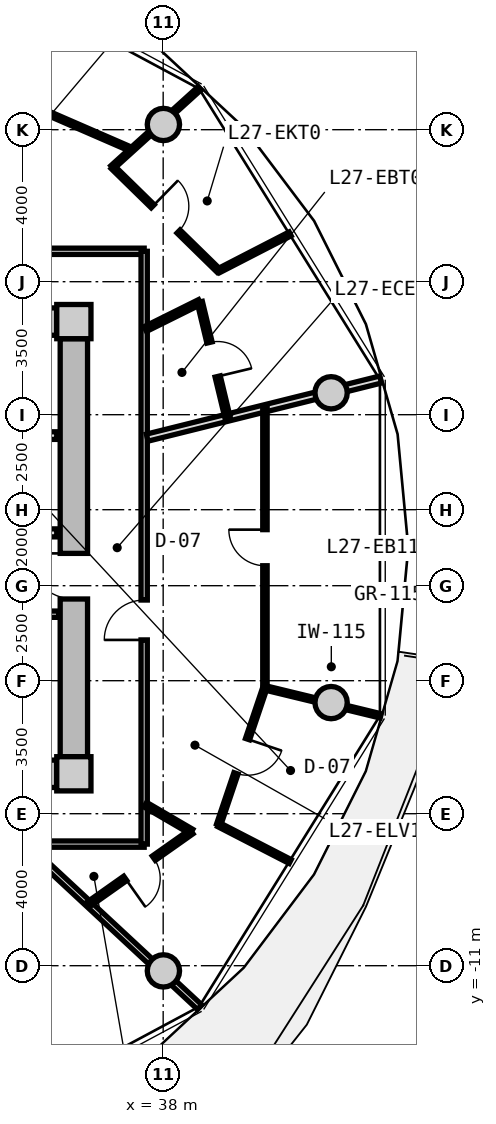
"""IFC4 building model, lengths in metres.
Left out: names, types, materials, properties, quantities, classifications, styles, units other than length and angle.
Written with IfcOpenShell. Run it as: python <this file> out.ifc"""

import sys

from ifc_helpers import new_model, si_unit, direction, frame, frame_2d, origin, origin_2d, place, context, subcontext, project, spatial, rectangle, circle, extrude, source, transform, mapped, element, fill, save


model = new_model("IFC4")
c1 = context("Model", 3, precision=1e-05, world=origin(), true_north=direction((0.0, 1.0)))
c2 = subcontext(c1, "Body", "Model", "MODEL_VIEW")
j1 = project(units=[si_unit("LENGTHUNIT", "METRE"), si_unit("PLANEANGLEUNIT", "RADIAN")], contexts=[c1])
p1 = place(None, origin())
s1 = spatial("IfcSite", under=j1, at=p1, CompositionType="ELEMENT")
p2 = place(p1, origin())
s2 = spatial("IfcBuilding", under=s1, at=p2, CompositionType="ELEMENT")
p3 = place(p2, frame((0.0, 0.0, 90.15)))
s3 = spatial("IfcBuildingStorey", under=s2, at=p3, CompositionType="ELEMENT", Elevation=90.15)
m1 = source(origin(), c2, "Body", "SweptSolid", [
    extrude(rectangle(XDim=0.9, YDim=0.9, at=origin_2d()), origin(), (0.0, 0.0, 1.0), 3.05),
])
for number, where, z_axis, x_axis in (
    (1, (35.65, -5.95, 0.0), (0.0, 0.0, 1.0), (1.0, 0.0, 0.0)),
    (2, (35.65, 5.95, 0.0), (0.0, 0.0, 1.0), (1.0, 0.0, 0.0)),
):
    element("IfcColumn", number, at=place(p3, frame(where, z_axis=z_axis, x_axis=x_axis)), inside=s3, PredefinedType="COLUMN", context=c2, shape_type="MappedRepresentation", body=[
        mapped(m1, transform((0.0, 0.0, 0.0), x_axis=(1.0, 0.0, 0.0), y_axis=(0.0, 1.0, 0.0), z_axis=(0.0, 0.0, 1.0), scale=1.0)),
    ])
m2 = source(origin(), c2, "Body", "SweptSolid", [
    extrude(rectangle(XDim=14.4, YDim=0.72, at=frame_2d((7.2, 0.0))), origin(), (0.0, 0.0, 1.0), 2.79),
])
for number, where, z_axis, x_axis in (
    (3, (20.8, 5.95, 0.0), (0.0, 0.0, 1.0), (1.0, 0.0, 0.0)),
    (4, (35.2, -5.95, 0.0), (0.0, 0.0, 1.0), (-1.0, 0.0, 0.0)),
):
    element("IfcWall", number, at=place(p3, frame(where, z_axis=z_axis, x_axis=x_axis)), inside=s3, PredefinedType="SHEAR", context=c2, shape_type="MappedRepresentation", body=[
        mapped(m2, transform((0.0, 0.0, 0.0), x_axis=(1.0, 0.0, 0.0), y_axis=(0.0, 1.0, 0.0), z_axis=(0.0, 0.0, 1.0), scale=1.0)),
    ])
m3 = source(origin(), c2, "Body", "SweptSolid", [
    extrude(rectangle(XDim=11.0, YDim=0.72, at=frame_2d((5.5, 0.0))), origin(), (0.0, 0.0, 1.0), 2.79),
])
p4 = place(p3, frame((35.65, 5.5, 0.0), z_axis=(0.0, 0.0, 1.0), x_axis=(0.0, -1.0, 0.0)))
e5 = element("IfcWall", 5, at=p4, inside=s3, PredefinedType="SHEAR", context=c2, shape_type="MappedRepresentation", body=[
    mapped(m3, transform((0.0, 0.0, 0.0), x_axis=(1.0, 0.0, 0.0), y_axis=(0.0, 1.0, 0.0), z_axis=(0.0, 0.0, 1.0), scale=1.0)),
])
p5 = place(p4, frame((5.65, 0.0, 0.0)))
e6 = element("IfcOpeningElement", 6, at=p5, cuts=e5, PredefinedType="OPENING", context=c2, shape_type="SweptSolid", body=[
    extrude(rectangle(XDim=1.2, YDim=2.15, at=frame_2d((0.6, 1.075))), frame((0.0, 0.37, 0.0), z_axis=(0.0, -1.0, 0.0), x_axis=(1.0, 0.0, 0.0)), (0.0, 0.0, 1.0), 0.74),
])
m4 = source(origin(), c2, "Body", "SweptSolid", [
    extrude(circle(Radius=0.425, at=origin_2d()), origin(), (0.0, 0.0, 1.0), 3.05),
])
for number, where, z_axis, x_axis in (
    (7, (42.419, 4.076, 0.0), (0.0, 0.0, 1.0), (1.0, 0.0, 0.0)),
    (8, (38.006, 11.137, 0.0), (0.0, 0.0, 1.0), (1.0, 0.0, 0.0)),
    (9, (38.006, -11.137, 0.0), (0.0, 0.0, 1.0), (1.0, 0.0, 0.0)),
    (10, (42.419, -4.076, 0.0), (0.0, 0.0, 1.0), (1.0, 0.0, 0.0)),
):
    element("IfcColumn", number, at=place(p3, frame(where, z_axis=z_axis, x_axis=x_axis)), inside=s3, PredefinedType="COLUMN", context=c2, shape_type="MappedRepresentation", body=[
        mapped(m4, transform((0.0, 0.0, 0.0), x_axis=(1.0, 0.0, 0.0), y_axis=(0.0, 1.0, 0.0), z_axis=(0.0, 0.0, 1.0), scale=1.0)),
    ])
m5 = source(origin(), c2, "Body", "SweptSolid", [
    extrude(rectangle(XDim=3.2, YDim=0.2, at=frame_2d((1.6, 0.0))), origin(), (0.0, 0.0, 1.0), 2.775),
])
p6 = place(p3, frame((32.0, 2.95, 0.0), z_axis=(0.0, 0.0, 1.0), x_axis=(1.0, 0.0, 0.0)))
e11 = element("IfcWall", 11, at=p6, inside=s3, PredefinedType="PARTITIONING", context=c2, shape_type="MappedRepresentation", body=[
    mapped(m5, transform((0.0, 0.0, 0.0), x_axis=(1.0, 0.0, 0.0), y_axis=(0.0, 1.0, 0.0), z_axis=(0.0, 0.0, 1.0), scale=1.0)),
])
m6 = source(origin(), c2, "Body", "SweptSolid", [
    extrude(rectangle(XDim=6.66, YDim=0.21, at=frame_2d((3.33, 0.0))), origin(), (0.0, 0.0, 1.0), 2.775),
])
p7 = place(p3, frame((28.54, 0.39, 0.0), z_axis=(0.0, 0.0, 1.0), x_axis=(1.0, 0.0, 0.0)))
e12 = element("IfcWall", 12, at=p7, inside=s3, PredefinedType="PARTITIONING", context=c2, shape_type="MappedRepresentation", body=[
    mapped(m6, transform((0.0, 0.0, 0.0), x_axis=(1.0, 0.0, 0.0), y_axis=(0.0, 1.0, 0.0), z_axis=(0.0, 0.0, 1.0), scale=1.0)),
])
p8 = place(p7, frame((1.0, 0.0, 0.0)))
e13 = element("IfcOpeningElement", 13, at=p8, cuts=e12, PredefinedType="OPENING", context=c2, shape_type="SweptSolid", body=[
    extrude(rectangle(XDim=1.2, YDim=2.15, at=frame_2d((0.6, 1.075))), frame((0.0, 0.115, 0.0), z_axis=(0.0, -1.0, 0.0), x_axis=(1.0, 0.0, 0.0)), (0.0, 0.0, 1.0), 0.23),
])
m7 = source(origin(), c2, "Body", "SweptSolid", [
    extrude(rectangle(XDim=2.7, YDim=0.165, at=frame_2d((1.35, 0.0))), origin(), (0.0, 0.0, 1.0), 2.775),
])
p9 = place(p3, frame((32.55, -1.75, 0.0), z_axis=(0.0, 0.0, 1.0), x_axis=(1.0, 0.0, 0.0)))
e14 = element("IfcWall", 14, at=p9, inside=s3, PredefinedType="PARTITIONING", context=c2, shape_type="MappedRepresentation", body=[
    mapped(m7, transform((0.0, 0.0, 0.0), x_axis=(1.0, 0.0, 0.0), y_axis=(0.0, 1.0, 0.0), z_axis=(0.0, 0.0, 1.0), scale=1.0)),
])
p10 = place(p9, frame((0.222, 0.0, 0.0)))
e15 = element("IfcOpeningElement", 15, at=p10, cuts=e14, PredefinedType="OPENING", context=c2, shape_type="SweptSolid", body=[
    extrude(rectangle(XDim=0.925, YDim=2.1, at=frame_2d((0.462, 1.05))), frame((0.0, 0.093, 0.0), z_axis=(0.0, -1.0, 0.0), x_axis=(1.0, 0.0, 0.0)), (0.0, 0.0, 1.0), 0.185),
])
p11 = place(p9, frame((1.522, 0.0, 0.0)))
e16 = element("IfcOpeningElement", 16, at=p11, cuts=e14, PredefinedType="OPENING", context=c2, shape_type="SweptSolid", body=[
    extrude(rectangle(XDim=0.925, YDim=2.1, at=frame_2d((0.462, 1.05))), frame((0.0, 0.093, 0.0), z_axis=(0.0, -1.0, 0.0), x_axis=(1.0, 0.0, 0.0)), (0.0, 0.0, 1.0), 0.185),
])
m8 = source(origin(), c2, "Body", "SweptSolid", [
    extrude(rectangle(XDim=9.234, YDim=0.165, at=frame_2d((4.617, 0.0))), origin(), (0.0, 0.0, 1.0), 2.775),
])
p12 = place(p3, frame((28.266, 7.8, 0.0), z_axis=(0.0, 0.0, 1.0), x_axis=(1.0, 0.0, 0.0)))
e17 = element("IfcWall", 17, at=p12, inside=s3, PredefinedType="PARTITIONING", context=c2, shape_type="MappedRepresentation", body=[
    mapped(m8, transform((0.0, 0.0, 0.0), x_axis=(1.0, 0.0, 0.0), y_axis=(0.0, 1.0, 0.0), z_axis=(0.0, 0.0, 1.0), scale=1.0)),
])
p13 = place(p12, frame((4.092, 0.0, 0.0)))
e18 = element("IfcOpeningElement", 18, at=p13, cuts=e17, PredefinedType="OPENING", context=c2, shape_type="SweptSolid", body=[
    extrude(rectangle(XDim=1.05, YDim=2.15, at=frame_2d((0.525, 1.075))), frame((0.0, 0.093, 0.0), z_axis=(0.0, -1.0, 0.0), x_axis=(1.0, 0.0, 0.0)), (0.0, 0.0, 1.0), 0.185),
])
m9 = source(origin(), c2, "Body", "SweptSolid", [
    extrude(rectangle(XDim=8.6, YDim=0.165, at=frame_2d((4.3, 0.0))), origin(), (0.0, 0.0, 1.0), 2.775),
])
p14 = place(p3, frame((37.5, -7.8, 0.0), z_axis=(0.0, 0.0, 1.0), x_axis=(-1.0, 0.0, 0.0)))
e19 = element("IfcWall", 19, at=p14, inside=s3, PredefinedType="PARTITIONING", context=c2, shape_type="MappedRepresentation", body=[
    mapped(m9, transform((0.0, 0.0, 0.0), x_axis=(1.0, 0.0, 0.0), y_axis=(0.0, 1.0, 0.0), z_axis=(0.0, 0.0, 1.0), scale=1.0)),
])
m10 = source(origin(), c2, "Body", "SweptSolid", [
    extrude(rectangle(XDim=15.6, YDim=0.165, at=frame_2d((7.8, 0.0))), origin(), (0.0, 0.0, 1.0), 2.775),
])
p15 = place(p3, frame((37.5, 7.8, 0.0), z_axis=(0.0, 0.0, 1.0), x_axis=(0.0, -1.0, 0.0)))
e20 = element("IfcWall", 20, at=p15, inside=s3, PredefinedType="PARTITIONING", context=c2, shape_type="MappedRepresentation", body=[
    mapped(m10, transform((0.0, 0.0, 0.0), x_axis=(1.0, 0.0, 0.0), y_axis=(0.0, 1.0, 0.0), z_axis=(0.0, 0.0, 1.0), scale=1.0)),
])
p16 = place(p15, frame((9.177, 0.0, 0.0)))
e21 = element("IfcOpeningElement", 21, at=p16, cuts=e20, PredefinedType="OPENING", context=c2, shape_type="SweptSolid", body=[
    extrude(rectangle(XDim=1.05, YDim=2.15, at=frame_2d((0.525, 1.075))), frame((0.0, 0.093, 0.0), z_axis=(0.0, -1.0, 0.0), x_axis=(1.0, 0.0, 0.0)), (0.0, 0.0, 1.0), 0.185),
])
m11 = source(origin(), c2, "Body", "SweptSolid", [
    extrude(rectangle(XDim=6.187, YDim=0.165, at=frame_2d((3.093, 0.0))), origin(), (0.0, 0.0, 1.0), 2.275),
])
p17 = place(p3, frame((34.429, -7.88, 0.0), z_axis=(0.0, 0.0, 1.0), x_axis=(0.732501077882, -0.680765870841, 0.0)))
e22 = element("IfcWall", 22, at=p17, inside=s3, PredefinedType="PARTITIONING", context=c2, shape_type="MappedRepresentation", body=[
    mapped(m11, transform((0.0, 0.0, 0.0), x_axis=(1.0, 0.0, 0.0), y_axis=(0.0, 1.0, 0.0), z_axis=(0.0, 0.0, 1.0), scale=1.0)),
])
m12 = source(origin(), c2, "Body", "SweptSolid", [
    extrude(rectangle(XDim=6.331, YDim=0.19, at=frame_2d((3.165, 0.0))), origin(), (0.0, 0.0, 1.0), 2.275),
])
p18 = place(p3, frame((37.58, 2.896, 0.0), z_axis=(0.0, 0.0, 1.0), x_axis=(0.97036440661, 0.241646267062, 0.0)))
e23 = element("IfcWall", 23, at=p18, inside=s3, PredefinedType="PARTITIONING", context=c2, shape_type="MappedRepresentation", body=[
    mapped(m12, transform((0.0, 0.0, 0.0), x_axis=(1.0, 0.0, 0.0), y_axis=(0.0, 1.0, 0.0), z_axis=(0.0, 0.0, 1.0), scale=1.0)),
])
m13 = source(origin(), c2, "Body", "SweptSolid", [
    extrude(rectangle(XDim=7.375, YDim=0.115, at=frame_2d((3.688, 0.0))), origin(), (0.0, 0.0, 1.0), 2.775),
])
p19 = place(p3, frame((40.678, -3.688, 0.0), z_axis=(0.0, 0.0, 1.0), x_axis=(0.0, 1.0, 0.0)))
e24 = element("IfcWall", 24, at=p19, inside=s3, PredefinedType="PARTITIONING", context=c2, shape_type="MappedRepresentation", body=[
    mapped(m13, transform((0.0, 0.0, 0.0), x_axis=(1.0, 0.0, 0.0), y_axis=(0.0, 1.0, 0.0), z_axis=(0.0, 0.0, 1.0), scale=1.0)),
])
p20 = place(p19, frame((3.213, 0.0, 0.0)))
e25 = element("IfcOpeningElement", 25, at=p20, cuts=e24, PredefinedType="OPENING", context=c2, shape_type="SweptSolid", body=[
    extrude(rectangle(XDim=0.95, YDim=2.1, at=frame_2d((0.475, 1.05))), frame((0.0, 0.067, 0.0), z_axis=(0.0, -1.0, 0.0), x_axis=(1.0, 0.0, 0.0)), (0.0, 0.0, 1.0), 0.135),
])
m14 = source(origin(), c2, "Body", "SweptSolid", [
    extrude(rectangle(XDim=3.133, YDim=0.115, at=frame_2d((1.567, 0.0))), origin(), (0.0, 0.0, 1.0), 2.275),
])
p21 = place(p3, frame((40.678, -3.688, 0.0), z_axis=(0.0, 0.0, 1.0), x_axis=(0.971863619682, -0.235544273414, 0.0)))
e26 = element("IfcWall", 26, at=p21, inside=s3, PredefinedType="PARTITIONING", context=c2, shape_type="MappedRepresentation", body=[
    mapped(m14, transform((0.0, 0.0, 0.0), x_axis=(1.0, 0.0, 0.0), y_axis=(0.0, 1.0, 0.0), z_axis=(0.0, 0.0, 1.0), scale=1.0)),
])
m15 = source(origin(), c2, "Body", "SweptSolid", [
    extrude(rectangle(XDim=1.407, YDim=0.14, at=frame_2d((0.704, 0.0))), origin(), (0.0, 0.0, 1.0), 2.775),
])
p22 = place(p3, frame((37.53, -6.762, 0.0), z_axis=(0.0, 0.0, 1.0), x_axis=(0.863539718977, -0.504280828258, 0.0)))
e27 = element("IfcWall", 27, at=p22, inside=s3, PredefinedType="PARTITIONING", context=c2, shape_type="MappedRepresentation", body=[
    mapped(m15, transform((0.0, 0.0, 0.0), x_axis=(1.0, 0.0, 0.0), y_axis=(0.0, 1.0, 0.0), z_axis=(0.0, 0.0, 1.0), scale=1.0)),
])
m16 = source(origin(), c2, "Body", "SweptSolid", [
    extrude(rectangle(XDim=3.347, YDim=0.14, at=frame_2d((1.673, 0.0))), origin(), (0.0, 0.0, 1.0), 2.775),
])
p23 = place(p3, frame((38.745, -7.472, 0.0), z_axis=(0.0, 0.0, 1.0), x_axis=(-0.81705680263, -0.576557179537, 0.0)))
e28 = element("IfcWall", 28, at=p23, inside=s3, PredefinedType="PARTITIONING", context=c2, shape_type="MappedRepresentation", body=[
    mapped(m16, transform((0.0, 0.0, 0.0), x_axis=(1.0, 0.0, 0.0), y_axis=(0.0, 1.0, 0.0), z_axis=(0.0, 0.0, 1.0), scale=1.0)),
])
p24 = place(p23, frame((1.214, 0.0, 0.0)))
e29 = element("IfcOpeningElement", 29, at=p24, cuts=e28, PredefinedType="OPENING", context=c2, shape_type="SweptSolid", body=[
    extrude(rectangle(XDim=0.92, YDim=2.1, at=frame_2d((0.46, 1.05))), frame((0.0, 0.08, 0.0), z_axis=(0.0, -1.0, 0.0), x_axis=(1.0, 0.0, 0.0)), (0.0, 0.0, 1.0), 0.16),
])
m17 = source(origin(), c2, "Body", "SweptSolid", [
    extrude(rectangle(XDim=2.117, YDim=0.115, at=frame_2d((1.059, 0.0))), origin(), (0.0, 0.0, 1.0), 2.775),
])
p25 = place(p3, frame((39.46, -7.289, 0.0), z_axis=(0.0, 0.0, 1.0), x_axis=(0.888941834945, -0.45802010227, 0.0)))
e30 = element("IfcWall", 30, at=p25, inside=s3, PredefinedType="PARTITIONING", context=c2, shape_type="MappedRepresentation", body=[
    mapped(m17, transform((0.0, 0.0, 0.0), x_axis=(1.0, 0.0, 0.0), y_axis=(0.0, 1.0, 0.0), z_axis=(0.0, 0.0, 1.0), scale=1.0)),
])
m18 = source(origin(), c2, "Body", "SweptSolid", [
    extrude(rectangle(XDim=3.801, YDim=0.115, at=frame_2d((1.901, 0.0))), origin(), (0.0, 0.0, 1.0), 2.775),
])
p26 = place(p3, frame((39.46, -7.289, 0.0), z_axis=(0.0, 0.0, 1.0), x_axis=(0.320097904666, 0.947384468644, 0.0)))
e31 = element("IfcWall", 31, at=p26, inside=s3, PredefinedType="PARTITIONING", context=c2, shape_type="MappedRepresentation", body=[
    mapped(m18, transform((0.0, 0.0, 0.0), x_axis=(1.0, 0.0, 0.0), y_axis=(0.0, 1.0, 0.0), z_axis=(0.0, 0.0, 1.0), scale=1.0)),
])
p27 = place(p26, frame((1.426, 0.0, 0.0)))
e32 = element("IfcOpeningElement", 32, at=p27, cuts=e31, PredefinedType="OPENING", context=c2, shape_type="SweptSolid", body=[
    extrude(rectangle(XDim=0.95, YDim=2.1, at=frame_2d((0.475, 1.05))), frame((0.0, 0.067, 0.0), z_axis=(0.0, -1.0, 0.0), x_axis=(1.0, 0.0, 0.0)), (0.0, 0.0, 1.0), 0.135),
])
m19 = source(origin(), c2, "Body", "SweptSolid", [
    extrude(rectangle(XDim=7.938, YDim=0.115, at=frame_2d((3.969, 0.0))), origin(), (0.0, 0.0, 1.0), 2.775),
])
p28 = place(p3, frame((37.164, 10.479, 0.0), z_axis=(0.0, 0.0, 1.0), x_axis=(-0.917052940979, 0.398765474235, 0.0)))
e33 = element("IfcWall", 33, at=p28, inside=s3, PredefinedType="PARTITIONING", context=c2, shape_type="MappedRepresentation", body=[
    mapped(m19, transform((0.0, 0.0, 0.0), x_axis=(1.0, 0.0, 0.0), y_axis=(0.0, 1.0, 0.0), z_axis=(0.0, 0.0, 1.0), scale=1.0)),
])
p29 = place(p28, frame((3.494, 0.0, 0.0)))
e34 = element("IfcOpeningElement", 34, at=p29, cuts=e33, PredefinedType="OPENING", context=c2, shape_type="SweptSolid", body=[
    extrude(rectangle(XDim=0.95, YDim=2.1, at=frame_2d((0.475, 1.05))), frame((0.0, 0.067, 0.0), z_axis=(0.0, -1.0, 0.0), x_axis=(1.0, 0.0, 0.0)), (0.0, 0.0, 1.0), 0.135),
])
m20 = source(origin(), c2, "Body", "SweptSolid", [
    extrude(rectangle(XDim=3.102, YDim=0.115, at=frame_2d((1.551, 0.0))), origin(), (0.0, 0.0, 1.0), 2.275),
])
p30 = place(p3, frame((36.661, 10.01, 0.0), z_axis=(0.0, 0.0, 1.0), x_axis=(0.741263481794, 0.671214161471, 0.0)))
e35 = element("IfcWall", 35, at=p30, inside=s3, PredefinedType="PARTITIONING", context=c2, shape_type="MappedRepresentation", body=[
    mapped(m20, transform((0.0, 0.0, 0.0), x_axis=(1.0, 0.0, 0.0), y_axis=(0.0, 1.0, 0.0), z_axis=(0.0, 0.0, 1.0), scale=1.0)),
])
m21 = source(origin(), c2, "Body", "SweptSolid", [
    extrude(rectangle(XDim=1.6, YDim=0.14, at=frame_2d((0.8, 0.0))), origin(), (0.0, 0.0, 1.0), 2.775),
])
p31 = place(p3, frame((37.53, 5.754, 0.0), z_axis=(0.0, 0.0, 1.0), x_axis=(0.895522919837, 0.445015393044, 0.0)))
e36 = element("IfcWall", 36, at=p31, inside=s3, PredefinedType="PARTITIONING", context=c2, shape_type="MappedRepresentation", body=[
    mapped(m21, transform((0.0, 0.0, 0.0), x_axis=(1.0, 0.0, 0.0), y_axis=(0.0, 1.0, 0.0), z_axis=(0.0, 0.0, 1.0), scale=1.0)),
])
m22 = source(origin(), c2, "Body", "SweptSolid", [
    extrude(rectangle(XDim=3.112, YDim=0.14, at=frame_2d((1.556, 0.0))), origin(), (0.0, 0.0, 1.0), 2.415),
])
p32 = place(p3, frame((38.963, 6.466, 0.0), z_axis=(0.0, 0.0, 1.0), x_axis=(0.233737944029, -0.972299631555, 0.0)))
e37 = element("IfcWall", 37, at=p32, inside=s3, PredefinedType="PARTITIONING", context=c2, shape_type="MappedRepresentation", body=[
    mapped(m22, transform((0.0, 0.0, 0.0), x_axis=(1.0, 0.0, 0.0), y_axis=(0.0, 1.0, 0.0), z_axis=(0.0, 0.0, 1.0), scale=1.0)),
])
p33 = place(p32, frame((1.096, 0.0, 0.0)))
e38 = element("IfcOpeningElement", 38, at=p33, cuts=e37, PredefinedType="OPENING", context=c2, shape_type="SweptSolid", body=[
    extrude(rectangle(XDim=0.92, YDim=2.1, at=frame_2d((0.46, 1.05))), frame((0.0, 0.08, 0.0), z_axis=(0.0, -1.0, 0.0), x_axis=(1.0, 0.0, 0.0)), (0.0, 0.0, 1.0), 0.16),
])
p34 = place(p3, frame((39.46, 7.289, 0.0), z_axis=(0.0, 0.0, 1.0), x_axis=(0.888941834945, 0.45802010227, 0.0)))
e39 = element("IfcWall", 39, at=p34, inside=s3, PredefinedType="PARTITIONING", context=c2, shape_type="MappedRepresentation", body=[
    mapped(m17, transform((0.0, 0.0, 0.0), x_axis=(1.0, 0.0, 0.0), y_axis=(0.0, 1.0, 0.0), z_axis=(0.0, 0.0, 1.0), scale=1.0)),
])
m23 = source(origin(), c2, "Body", "SweptSolid", [
    extrude(rectangle(XDim=3.902, YDim=0.115, at=frame_2d((1.951, 0.0))), origin(), (0.0, 0.0, 1.0), 2.775),
])
p35 = place(p3, frame((39.46, 7.289, 0.0), z_axis=(0.0, 0.0, 1.0), x_axis=(-0.714853061854, 0.699274695637, 0.0)))
e40 = element("IfcWall", 40, at=p35, inside=s3, PredefinedType="PARTITIONING", context=c2, shape_type="MappedRepresentation", body=[
    mapped(m23, transform((0.0, 0.0, 0.0), x_axis=(1.0, 0.0, 0.0), y_axis=(0.0, 1.0, 0.0), z_axis=(0.0, 0.0, 1.0), scale=1.0)),
])
p36 = place(p35, frame((1.476, 0.0, 0.0)))
e41 = element("IfcOpeningElement", 41, at=p36, cuts=e40, PredefinedType="OPENING", context=c2, shape_type="SweptSolid", body=[
    extrude(rectangle(XDim=0.95, YDim=2.1, at=frame_2d((0.475, 1.05))), frame((0.0, 0.067, 0.0), z_axis=(0.0, -1.0, 0.0), x_axis=(1.0, 0.0, 0.0)), (0.0, 0.0, 1.0), 0.135),
])
m24 = source(origin(), c2, "Body", "SweptSolid", [
    extrude(rectangle(XDim=1.2, YDim=2.15, at=frame_2d((0.6, 1.075))), frame((0.0, 0.025, 0.0), z_axis=(0.0, -1.0, 0.0), x_axis=(1.0, 0.0, 0.0)), (0.0, 0.0, 1.0), 0.05),
])
p37 = place(p5, frame((1.2, 0.0, 0.0), z_axis=(0.0, 0.0, 1.0), x_axis=(-1.0, 0.0, 0.0)))
e42 = element("IfcDoor", 42, at=p37, inside=s3, OperationType="SINGLE_SWING_RIGHT", PredefinedType="DOOR", context=c2, shape_type="MappedRepresentation", body=[
    mapped(m24, transform((0.0, 0.0, 0.0), x_axis=(1.0, 0.0, 0.0), y_axis=(0.0, 1.0, 0.0), z_axis=(0.0, 0.0, 1.0), scale=1.0)),
])
fill(e6, e42)
m25 = source(origin(), c2, "Body", "SweptSolid", [
    extrude(rectangle(XDim=1.05, YDim=2.15, at=frame_2d((0.525, 1.075))), frame((0.0, 0.025, 0.0), z_axis=(0.0, -1.0, 0.0), x_axis=(1.0, 0.0, 0.0)), (0.0, 0.0, 1.0), 0.05),
])
p38 = place(p16, frame((1.05, 0.0, 0.0), z_axis=(0.0, 0.0, 1.0), x_axis=(-1.0, 0.0, 0.0)))
e43 = element("IfcDoor", 43, at=p38, inside=s3, OperationType="SINGLE_SWING_LEFT", PredefinedType="DOOR", context=c2, shape_type="MappedRepresentation", body=[
    mapped(m25, transform((0.0, 0.0, 0.0), x_axis=(1.0, 0.0, 0.0), y_axis=(0.0, 1.0, 0.0), z_axis=(0.0, 0.0, 1.0), scale=1.0)),
])
fill(e21, e43)
m26 = source(origin(), c2, "Body", "SweptSolid", [
    extrude(rectangle(XDim=0.92, YDim=2.1, at=frame_2d((0.46, 1.05))), frame((0.0, 0.025, 0.0), z_axis=(0.0, -1.0, 0.0), x_axis=(1.0, 0.0, 0.0)), (0.0, 0.0, 1.0), 0.05),
])
p39 = place(p24, origin())
e44 = element("IfcDoor", 44, at=p39, inside=s3, OperationType="SINGLE_SWING_RIGHT", PredefinedType="DOOR", context=c2, shape_type="MappedRepresentation", body=[
    mapped(m26, transform((0.0, 0.0, 0.0), x_axis=(1.0, 0.0, 0.0), y_axis=(0.0, 1.0, 0.0), z_axis=(0.0, 0.0, 1.0), scale=1.0)),
])
fill(e29, e44)
m27 = source(origin(), c2, "Body", "SweptSolid", [
    extrude(rectangle(XDim=0.95, YDim=2.1, at=frame_2d((0.475, 1.05))), frame((0.0, 0.025, 0.0), z_axis=(0.0, -1.0, 0.0), x_axis=(1.0, 0.0, 0.0)), (0.0, 0.0, 1.0), 0.05),
])
p40 = place(p27, frame((0.95, 0.0, 0.0), z_axis=(0.0, 0.0, 1.0), x_axis=(-1.0, 0.0, 0.0)))
e45 = element("IfcDoor", 45, at=p40, inside=s3, OperationType="SINGLE_SWING_LEFT", PredefinedType="DOOR", context=c2, shape_type="MappedRepresentation", body=[
    mapped(m27, transform((0.0, 0.0, 0.0), x_axis=(1.0, 0.0, 0.0), y_axis=(0.0, 1.0, 0.0), z_axis=(0.0, 0.0, 1.0), scale=1.0)),
])
fill(e32, e45)
p41 = place(p20, origin())
e46 = element("IfcDoor", 46, at=p41, inside=s3, OperationType="SINGLE_SWING_RIGHT", PredefinedType="DOOR", context=c2, shape_type="MappedRepresentation", body=[
    mapped(m27, transform((0.0, 0.0, 0.0), x_axis=(1.0, 0.0, 0.0), y_axis=(0.0, 1.0, 0.0), z_axis=(0.0, 0.0, 1.0), scale=1.0)),
])
fill(e25, e46)
p42 = place(p33, origin())
e47 = element("IfcDoor", 47, at=p42, inside=s3, OperationType="SINGLE_SWING_RIGHT", PredefinedType="DOOR", context=c2, shape_type="MappedRepresentation", body=[
    mapped(m26, transform((0.0, 0.0, 0.0), x_axis=(1.0, 0.0, 0.0), y_axis=(0.0, 1.0, 0.0), z_axis=(0.0, 0.0, 1.0), scale=1.0)),
])
fill(e38, e47)
p43 = place(p36, frame((0.95, 0.0, 0.0), z_axis=(0.0, 0.0, 1.0), x_axis=(-1.0, 0.0, 0.0)))
e48 = element("IfcDoor", 48, at=p43, inside=s3, OperationType="SINGLE_SWING_LEFT", PredefinedType="DOOR", context=c2, shape_type="MappedRepresentation", body=[
    mapped(m27, transform((0.0, 0.0, 0.0), x_axis=(1.0, 0.0, 0.0), y_axis=(0.0, 1.0, 0.0), z_axis=(0.0, 0.0, 1.0), scale=1.0)),
])
fill(e41, e48)
save(model, sys.argv[1])
